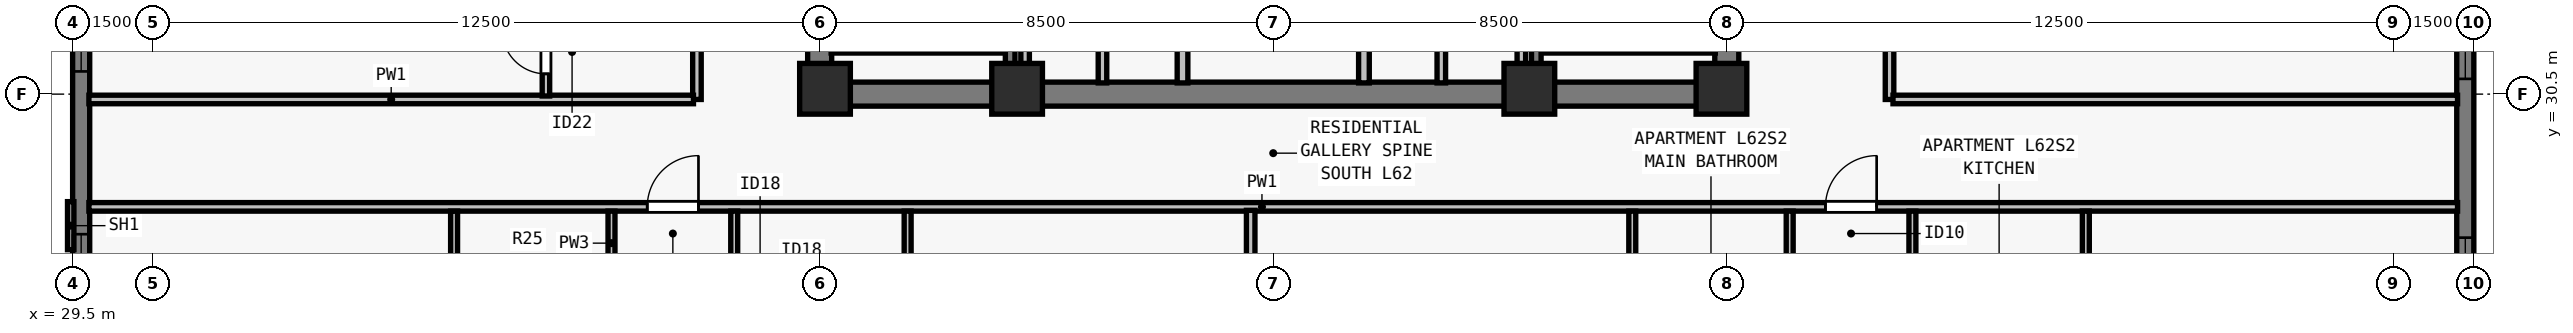
"""IFC4 building model, lengths in metres.
Left out: names, types, materials, properties, quantities, classifications, styles, units other than length and angle.
Written with IfcOpenShell. Run it as: python <this file> out.ifc"""

import sys

from ifc_helpers import new_model, si_unit, direction, frame, frame_2d, origin, origin_2d, place, context, subcontext, project, spatial, rectangle, extrude, element, fill, save


model = new_model("IFC4")
c1 = context("Model", 3, precision=1e-05, world=origin(), true_north=direction((0.0, 1.0)))
c2 = subcontext(c1, "Body", "Model", "MODEL_VIEW")
j1 = project(units=[si_unit("LENGTHUNIT", "METRE"), si_unit("PLANEANGLEUNIT", "RADIAN")], contexts=[c1])
p1 = place(None, origin())
s1 = spatial("IfcSite", under=j1, at=p1, CompositionType="ELEMENT")
p2 = place(p1, origin())
s2 = spatial("IfcBuilding", under=s1, at=p2, CompositionType="ELEMENT")
p3 = place(p2, frame((0.0, 0.0, 227.0)))
s3 = spatial("IfcBuildingStorey", under=s2, at=p3, CompositionType="ELEMENT", Elevation=227.0)
for number, where, z_axis, x_axis in (
    (1, (43.6, 30.6, 0.0), (0.0, 0.0, 1.0), (1.0, 0.0, 0.0)),
    (2, (47.2, 30.6, 0.0), (0.0, 0.0, 1.0), (1.0, 0.0, 0.0)),
    (3, (56.8, 30.6, 0.0), (0.0, 0.0, 1.0), (1.0, 0.0, 0.0)),
    (4, (60.4, 30.6, 0.0), (0.0, 0.0, 1.0), (1.0, 0.0, 0.0)),
):
    element("IfcColumn", number, at=place(p3, frame(where, z_axis=z_axis, x_axis=x_axis)), inside=s3, PredefinedType="COLUMN", context=c2, shape_type="SweptSolid", body=[
        extrude(rectangle(XDim=0.95, YDim=0.95, at=origin_2d()), origin(), (0.0, 0.0, 1.0), 3.5),
    ])
p4 = place(p3, frame((74.34, 56.5, 0.0), z_axis=(0.0, 0.0, 1.0), x_axis=(0.0, -1.0, 0.0)))
e5 = element("IfcWall", 5, at=p4, inside=s3, PredefinedType="SOLIDWALL", context=c2, shape_type="SweptSolid", body=[
    extrude(rectangle(XDim=34.702, YDim=0.32, at=frame_2d((17.351, 0.0))), origin(), (0.0, 0.0, 1.0), 3.29),
])
p5 = place(p4, frame((4.763, 0.0, 0.8)))
e6 = element("IfcOpeningElement", 6, at=p5, cuts=e5, PredefinedType="OPENING", context=c2, shape_type="SweptSolid", body=[
    extrude(rectangle(XDim=1.55, YDim=1.678, at=frame_2d((0.775, 0.839))), frame((0.0, 0.17, 0.0), z_axis=(0.0, -1.0, 0.0), x_axis=(1.0, 0.0, 0.0)), (0.0, 0.0, 1.0), 0.34),
])
p6 = place(p4, frame((9.238, 0.0, 0.8)))
e7 = element("IfcOpeningElement", 7, at=p6, cuts=e5, PredefinedType="OPENING", context=c2, shape_type="SweptSolid", body=[
    extrude(rectangle(XDim=1.85, YDim=1.678, at=frame_2d((0.925, 0.839))), frame((0.0, 0.17, 0.0), z_axis=(0.0, -1.0, 0.0), x_axis=(1.0, 0.0, 0.0)), (0.0, 0.0, 1.0), 0.34),
])
p7 = place(p4, frame((14.738, 0.0, 0.8)))
e8 = element("IfcOpeningElement", 8, at=p7, cuts=e5, PredefinedType="OPENING", context=c2, shape_type="SweptSolid", body=[
    extrude(rectangle(XDim=1.85, YDim=1.678, at=frame_2d((0.925, 0.839))), frame((0.0, 0.17, 0.0), z_axis=(0.0, -1.0, 0.0), x_axis=(1.0, 0.0, 0.0)), (0.0, 0.0, 1.0), 0.34),
])
p8 = place(p4, frame((18.264, 0.0, 0.8)))
e9 = element("IfcOpeningElement", 9, at=p8, cuts=e5, PredefinedType="OPENING", context=c2, shape_type="SweptSolid", body=[
    extrude(rectangle(XDim=1.55, YDim=1.678, at=frame_2d((0.775, 0.839))), frame((0.0, 0.17, 0.0), z_axis=(0.0, -1.0, 0.0), x_axis=(1.0, 0.0, 0.0)), (0.0, 0.0, 1.0), 0.34),
])
p9 = place(p4, frame((24.164, 0.0, 0.8)))
e10 = element("IfcOpeningElement", 10, at=p9, cuts=e5, PredefinedType="OPENING", context=c2, shape_type="SweptSolid", body=[
    extrude(rectangle(XDim=1.55, YDim=1.678, at=frame_2d((0.775, 0.839))), frame((0.0, 0.17, 0.0), z_axis=(0.0, -1.0, 0.0), x_axis=(1.0, 0.0, 0.0)), (0.0, 0.0, 1.0), 0.34),
])
p10 = place(p4, frame((28.689, 0.0, 0.8)))
e11 = element("IfcOpeningElement", 11, at=p10, cuts=e5, PredefinedType="OPENING", context=c2, shape_type="SweptSolid", body=[
    extrude(rectangle(XDim=1.85, YDim=1.678, at=frame_2d((0.925, 0.839))), frame((0.0, 0.17, 0.0), z_axis=(0.0, -1.0, 0.0), x_axis=(1.0, 0.0, 0.0)), (0.0, 0.0, 1.0), 0.34),
])
p11 = place(p4, frame((31.35, 0.0, 0.8)))
e12 = element("IfcOpeningElement", 12, at=p11, cuts=e5, PredefinedType="OPENING", context=c2, shape_type="SweptSolid", body=[
    extrude(rectangle(XDim=0.9, YDim=1.678, at=frame_2d((0.45, 0.839))), frame((0.0, 0.17, 0.0), z_axis=(0.0, -1.0, 0.0), x_axis=(1.0, 0.0, 0.0)), (0.0, 0.0, 1.0), 0.34),
])
p12 = place(p3, frame((29.66, 21.5, 0.0), z_axis=(0.0, 0.0, 1.0), x_axis=(0.0, 1.0, 0.0)))
e13 = element("IfcWall", 13, at=p12, inside=s3, PredefinedType="SOLIDWALL", context=c2, shape_type="SweptSolid", body=[
    extrude(rectangle(XDim=22.602, YDim=0.32, at=frame_2d((11.301, 0.0))), origin(), (0.0, 0.0, 1.0), 3.29),
])
p13 = place(p12, frame((4.825, 0.0, 0.8)))
e14 = element("IfcOpeningElement", 14, at=p13, cuts=e13, PredefinedType="OPENING", context=c2, shape_type="SweptSolid", body=[
    extrude(rectangle(XDim=1.55, YDim=1.678, at=frame_2d((0.775, 0.839))), frame((0.0, 0.17, 0.0), z_axis=(0.0, -1.0, 0.0), x_axis=(1.0, 0.0, 0.0)), (0.0, 0.0, 1.0), 0.34),
])
p14 = place(p12, frame((9.426, 0.0, 0.8)))
e15 = element("IfcOpeningElement", 15, at=p14, cuts=e13, PredefinedType="OPENING", context=c2, shape_type="SweptSolid", body=[
    extrude(rectangle(XDim=1.85, YDim=1.678, at=frame_2d((0.925, 0.839))), frame((0.0, 0.17, 0.0), z_axis=(0.0, -1.0, 0.0), x_axis=(1.0, 0.0, 0.0)), (0.0, 0.0, 1.0), 0.34),
])
p15 = place(p12, frame((15.177, 0.0, 0.8)))
e16 = element("IfcOpeningElement", 16, at=p15, cuts=e13, PredefinedType="OPENING", context=c2, shape_type="SweptSolid", body=[
    extrude(rectangle(XDim=1.85, YDim=1.678, at=frame_2d((0.925, 0.839))), frame((0.0, 0.17, 0.0), z_axis=(0.0, -1.0, 0.0), x_axis=(1.0, 0.0, 0.0)), (0.0, 0.0, 1.0), 0.34),
])
p16 = place(p12, frame((19.677, 0.0, 0.8)))
e17 = element("IfcOpeningElement", 17, at=p16, cuts=e13, PredefinedType="OPENING", context=c2, shape_type="SweptSolid", body=[
    extrude(rectangle(XDim=1.55, YDim=1.678, at=frame_2d((0.775, 0.839))), frame((0.0, 0.17, 0.0), z_axis=(0.0, -1.0, 0.0), x_axis=(1.0, 0.0, 0.0)), (0.0, 0.0, 1.0), 0.34),
])
p17 = place(p3, frame((43.275, 30.5, 0.0), z_axis=(0.0, 0.0, 1.0), x_axis=(1.0, 0.0, 0.0)))
e18 = element("IfcWall", 18, at=p17, inside=s3, PredefinedType="SHEAR", context=c2, shape_type="SweptSolid", body=[
    extrude(rectangle(XDim=17.45, YDim=0.45, at=frame_2d((8.725, 0.0))), origin(), (0.0, 0.0, 1.0), 3.29),
])
for number, where, z_axis, x_axis in (
    (19, (43.5, 30.715, 0.0), (0.0, 0.0, 1.0), (0.0, 1.0, 0.0)),
    (20, (60.5, 30.715, 0.0), (0.0, 0.0, 1.0), (0.0, 1.0, 0.0)),
):
    element("IfcWall", number, at=place(p3, frame(where, z_axis=z_axis, x_axis=x_axis)), inside=s3, PredefinedType="SHEAR", context=c2, shape_type="SweptSolid", body=[
        extrude(rectangle(XDim=8.035, YDim=0.45, at=frame_2d((4.018, 0.0))), origin(), (0.0, 0.0, 1.0), 3.29),
    ])
p18 = place(p3, frame((50.3, 30.71, 0.0), z_axis=(0.0, 0.0, 1.0), x_axis=(0.0, 1.0, 0.0)))
e21 = element("IfcWall", 21, at=p18, inside=s3, PredefinedType="SOLIDWALL", context=c2, shape_type="SweptSolid", body=[
    extrude(rectangle(XDim=7.905, YDim=0.2, at=frame_2d((3.953, 0.0))), origin(), (0.0, 0.0, 1.0), 3.29),
])
p19 = place(p18, frame((2.14, 0.0, 0.0)))
e22 = element("IfcOpeningElement", 22, at=p19, cuts=e21, PredefinedType="OPENING", context=c2, shape_type="SweptSolid", body=[
    extrude(rectangle(XDim=0.95, YDim=2.12, at=frame_2d((0.475, 1.06))), frame((0.0, 0.11, 0.0), z_axis=(0.0, -1.0, 0.0), x_axis=(1.0, 0.0, 0.0)), (0.0, 0.0, 1.0), 0.22),
])
p20 = place(p3, frame((53.7, 30.71, 0.0), z_axis=(0.0, 0.0, 1.0), x_axis=(0.0, 1.0, 0.0)))
e23 = element("IfcWall", 23, at=p20, inside=s3, PredefinedType="SOLIDWALL", context=c2, shape_type="SweptSolid", body=[
    extrude(rectangle(XDim=7.905, YDim=0.2, at=frame_2d((3.953, 0.0))), origin(), (0.0, 0.0, 1.0), 3.29),
])
p21 = place(p20, frame((2.14, 0.0, 0.0)))
e24 = element("IfcOpeningElement", 24, at=p21, cuts=e23, PredefinedType="OPENING", context=c2, shape_type="SweptSolid", body=[
    extrude(rectangle(XDim=0.95, YDim=2.12, at=frame_2d((0.475, 1.06))), frame((0.0, 0.11, 0.0), z_axis=(0.0, -1.0, 0.0), x_axis=(1.0, 0.0, 0.0)), (0.0, 0.0, 1.0), 0.22),
])
p22 = place(p3, frame((47.35, 30.71, 0.0), z_axis=(0.0, 0.0, 1.0), x_axis=(0.0, 1.0, 0.0)))
e25 = element("IfcWall", 25, at=p22, inside=s3, PredefinedType="PARTITIONING", context=c2, shape_type="SweptSolid", body=[
    extrude(rectangle(XDim=7.905, YDim=0.16, at=frame_2d((3.953, 0.0))), origin(), (0.0, 0.0, 1.0), 3.29),
])
p23 = place(p3, frame((48.8, 30.71, 0.0), z_axis=(0.0, 0.0, 1.0), x_axis=(0.0, 1.0, 0.0)))
e26 = element("IfcWall", 26, at=p23, inside=s3, PredefinedType="PARTITIONING", context=c2, shape_type="SweptSolid", body=[
    extrude(rectangle(XDim=7.905, YDim=0.16, at=frame_2d((3.953, 0.0))), origin(), (0.0, 0.0, 1.0), 3.29),
])
p24 = place(p23, frame((3.54, 0.0, 0.0)))
e27 = element("IfcOpeningElement", 27, at=p24, cuts=e26, PredefinedType="OPENING", context=c2, shape_type="SweptSolid", body=[
    extrude(rectangle(XDim=0.85, YDim=2.12, at=frame_2d((0.425, 1.06))), frame((0.0, 0.09, 0.0), z_axis=(0.0, -1.0, 0.0), x_axis=(1.0, 0.0, 0.0)), (0.0, 0.0, 1.0), 0.18),
])
p25 = place(p3, frame((56.65, 30.71, 0.0), z_axis=(0.0, 0.0, 1.0), x_axis=(0.0, 1.0, 0.0)))
e28 = element("IfcWall", 28, at=p25, inside=s3, PredefinedType="PARTITIONING", context=c2, shape_type="SweptSolid", body=[
    extrude(rectangle(XDim=7.905, YDim=0.16, at=frame_2d((3.953, 0.0))), origin(), (0.0, 0.0, 1.0), 3.29),
])
p26 = place(p3, frame((55.15, 30.71, 0.0), z_axis=(0.0, 0.0, 1.0), x_axis=(0.0, 1.0, 0.0)))
e29 = element("IfcWall", 29, at=p26, inside=s3, PredefinedType="PARTITIONING", context=c2, shape_type="SweptSolid", body=[
    extrude(rectangle(XDim=7.905, YDim=0.16, at=frame_2d((3.953, 0.0))), origin(), (0.0, 0.0, 1.0), 3.29),
])
p27 = place(p26, frame((3.54, 0.0, 0.0)))
e30 = element("IfcOpeningElement", 30, at=p27, cuts=e29, PredefinedType="OPENING", context=c2, shape_type="SweptSolid", body=[
    extrude(rectangle(XDim=0.85, YDim=2.12, at=frame_2d((0.425, 1.06))), frame((0.0, 0.09, 0.0), z_axis=(0.0, -1.0, 0.0), x_axis=(1.0, 0.0, 0.0)), (0.0, 0.0, 1.0), 0.18),
])
p28 = place(p3, frame((29.805, 28.387, 0.0), z_axis=(0.0, 0.0, 1.0), x_axis=(1.0, 0.0, 0.0)))
e31 = element("IfcWall", 31, at=p28, inside=s3, PredefinedType="PARTITIONING", context=c2, shape_type="SweptSolid", body=[
    extrude(rectangle(XDim=44.39, YDim=0.16, at=frame_2d((22.195, 0.0))), origin(), (0.0, 0.0, 1.0), 2.958),
])
p29 = place(p28, frame((10.464, 0.0, 0.0)))
e32 = element("IfcOpeningElement", 32, at=p29, cuts=e31, PredefinedType="OPENING", context=c2, shape_type="SweptSolid", body=[
    extrude(rectangle(XDim=0.96, YDim=2.18, at=frame_2d((0.48, 1.09))), frame((0.0, 0.09, 0.0), z_axis=(0.0, -1.0, 0.0), x_axis=(1.0, 0.0, 0.0)), (0.0, 0.0, 1.0), 0.18),
])
p30 = place(p28, frame((32.544, 0.0, 0.0)))
e33 = element("IfcOpeningElement", 33, at=p30, cuts=e31, PredefinedType="OPENING", context=c2, shape_type="SweptSolid", body=[
    extrude(rectangle(XDim=0.96, YDim=2.18, at=frame_2d((0.48, 1.09))), frame((0.0, 0.09, 0.0), z_axis=(0.0, -1.0, 0.0), x_axis=(1.0, 0.0, 0.0)), (0.0, 0.0, 1.0), 0.18),
])
p31 = place(p3, frame((41.2, 30.4, 0.0), z_axis=(0.0, 0.0, 1.0), x_axis=(0.0, 1.0, 0.0)))
e34 = element("IfcWall", 34, at=p31, inside=s3, PredefinedType="PARTITIONING", context=c2, shape_type="SweptSolid", body=[
    extrude(rectangle(XDim=17.2, YDim=0.16, at=frame_2d((8.6, 0.0))), origin(), (0.0, 0.0, 1.0), 3.29),
])
p32 = place(p31, frame((8.12, 0.0, 0.0)))
e35 = element("IfcOpeningElement", 35, at=p32, cuts=e34, PredefinedType="OPENING", context=c2, shape_type="SweptSolid", body=[
    extrude(rectangle(XDim=0.96, YDim=2.18, at=frame_2d((0.48, 1.09))), frame((0.0, 0.09, 0.0), z_axis=(0.0, -1.0, 0.0), x_axis=(1.0, 0.0, 0.0)), (0.0, 0.0, 1.0), 0.18),
])
p33 = place(p3, frame((63.55, 30.4, 0.0), z_axis=(0.0, 0.0, 1.0), x_axis=(0.0, 1.0, 0.0)))
e36 = element("IfcWall", 36, at=p33, inside=s3, PredefinedType="PARTITIONING", context=c2, shape_type="SweptSolid", body=[
    extrude(rectangle(XDim=17.2, YDim=0.16, at=frame_2d((8.6, 0.0))), origin(), (0.0, 0.0, 1.0), 3.29),
])
p34 = place(p33, frame((3.6, 0.0, 0.0)))
e37 = element("IfcOpeningElement", 37, at=p34, cuts=e36, PredefinedType="OPENING", context=c2, shape_type="SweptSolid", body=[
    extrude(rectangle(XDim=0.96, YDim=2.12, at=frame_2d((0.48, 1.06))), frame((0.0, 0.09, 0.0), z_axis=(0.0, -1.0, 0.0), x_axis=(1.0, 0.0, 0.0)), (0.0, 0.0, 1.0), 0.18),
])
p35 = place(p33, frame((12.44, 0.0, 0.0)))
e38 = element("IfcOpeningElement", 38, at=p35, cuts=e36, PredefinedType="OPENING", context=c2, shape_type="SweptSolid", body=[
    extrude(rectangle(XDim=0.96, YDim=2.18, at=frame_2d((0.48, 1.09))), frame((0.0, 0.09, 0.0), z_axis=(0.0, -1.0, 0.0), x_axis=(1.0, 0.0, 0.0)), (0.0, 0.0, 1.0), 0.18),
])
p36 = place(p3, frame((29.805, 30.4, 0.0), z_axis=(0.0, 0.0, 1.0), x_axis=(1.0, 0.0, 0.0)))
e39 = element("IfcWall", 39, at=p36, inside=s3, PredefinedType="PARTITIONING", context=c2, shape_type="SweptSolid", body=[
    extrude(rectangle(XDim=11.33, YDim=0.16, at=frame_2d((5.665, 0.0))), origin(), (0.0, 0.0, 1.0), 3.29),
])
p37 = place(p3, frame((63.615, 30.4, 0.0), z_axis=(0.0, 0.0, 1.0), x_axis=(1.0, 0.0, 0.0)))
e40 = element("IfcWall", 40, at=p37, inside=s3, PredefinedType="PARTITIONING", context=c2, shape_type="SweptSolid", body=[
    extrude(rectangle(XDim=10.58, YDim=0.16, at=frame_2d((5.29, 0.0))), origin(), (0.0, 0.0, 1.0), 3.29),
])
p38 = place(p3, frame((36.649, 25.558, 0.0), z_axis=(0.0, 0.0, 1.0), x_axis=(0.0, 1.0, 0.0)))
e41 = element("IfcWall", 41, at=p38, inside=s3, PredefinedType="PLUMBINGWALL", context=c2, shape_type="SweptSolid", body=[
    extrude(rectangle(XDim=2.75, YDim=0.13, at=frame_2d((1.375, 0.0))), origin(), (0.0, 0.0, 1.0), 3.29),
])
p39 = place(p3, frame((39.599, 25.558, 0.0), z_axis=(0.0, 0.0, 1.0), x_axis=(0.0, 1.0, 0.0)))
e42 = element("IfcWall", 42, at=p39, inside=s3, PredefinedType="PLUMBINGWALL", context=c2, shape_type="SweptSolid", body=[
    extrude(rectangle(XDim=2.75, YDim=0.13, at=frame_2d((1.375, 0.0))), origin(), (0.0, 0.0, 1.0), 3.29),
])
p40 = place(p39, frame((0.55, 0.0, 0.0)))
e43 = element("IfcOpeningElement", 43, at=p40, cuts=e42, PredefinedType="OPENING", context=c2, shape_type="SweptSolid", body=[
    extrude(rectangle(XDim=0.85, YDim=2.08, at=frame_2d((0.425, 1.04))), frame((0.0, 0.075, 0.0), z_axis=(0.0, -1.0, 0.0), x_axis=(1.0, 0.0, 0.0)), (0.0, 0.0, 1.0), 0.15),
])
p41 = place(p3, frame((45.149, 25.558, 0.0), z_axis=(0.0, 0.0, 1.0), x_axis=(0.0, 1.0, 0.0)))
e44 = element("IfcWall", 44, at=p41, inside=s3, PredefinedType="PLUMBINGWALL", context=c2, shape_type="SweptSolid", body=[
    extrude(rectangle(XDim=2.75, YDim=0.13, at=frame_2d((1.375, 0.0))), origin(), (0.0, 0.0, 1.0), 3.29),
])
p42 = place(p3, frame((41.899, 25.558, 0.0), z_axis=(0.0, 0.0, 1.0), x_axis=(0.0, 1.0, 0.0)))
e45 = element("IfcWall", 45, at=p42, inside=s3, PredefinedType="PLUMBINGWALL", context=c2, shape_type="SweptSolid", body=[
    extrude(rectangle(XDim=2.75, YDim=0.13, at=frame_2d((1.375, 0.0))), origin(), (0.0, 0.0, 1.0), 2.573),
])
p43 = place(p42, frame((0.55, 0.0, 0.0)))
e46 = element("IfcOpeningElement", 46, at=p43, cuts=e45, PredefinedType="OPENING", context=c2, shape_type="SweptSolid", body=[
    extrude(rectangle(XDim=0.88, YDim=2.1, at=frame_2d((0.44, 1.05))), frame((0.0, 0.075, 0.0), z_axis=(0.0, -1.0, 0.0), x_axis=(1.0, 0.0, 0.0)), (0.0, 0.0, 1.0), 0.15),
])
p44 = place(p3, frame((51.577, 16.805, 0.0), z_axis=(0.0, 0.0, 1.0), x_axis=(0.0, 1.0, 0.0)))
e47 = element("IfcWall", 47, at=p44, inside=s3, PredefinedType="PARTITIONING", context=c2, shape_type="SweptSolid", body=[
    extrude(rectangle(XDim=11.518, YDim=0.16, at=frame_2d((5.759, 0.0))), origin(), (0.0, 0.0, 1.0), 2.958),
])
p45 = place(p3, frame((58.729, 25.558, 0.0), z_axis=(0.0, 0.0, 1.0), x_axis=(0.0, 1.0, 0.0)))
e48 = element("IfcWall", 48, at=p45, inside=s3, PredefinedType="PLUMBINGWALL", context=c2, shape_type="SweptSolid", body=[
    extrude(rectangle(XDim=2.75, YDim=0.13, at=frame_2d((1.375, 0.0))), origin(), (0.0, 0.0, 1.0), 3.29),
])
p46 = place(p3, frame((61.679, 25.558, 0.0), z_axis=(0.0, 0.0, 1.0), x_axis=(0.0, 1.0, 0.0)))
e49 = element("IfcWall", 49, at=p46, inside=s3, PredefinedType="PLUMBINGWALL", context=c2, shape_type="SweptSolid", body=[
    extrude(rectangle(XDim=2.75, YDim=0.13, at=frame_2d((1.375, 0.0))), origin(), (0.0, 0.0, 1.0), 3.29),
])
p47 = place(p46, frame((0.55, 0.0, 0.0)))
e50 = element("IfcOpeningElement", 50, at=p47, cuts=e49, PredefinedType="OPENING", context=c2, shape_type="SweptSolid", body=[
    extrude(rectangle(XDim=0.85, YDim=2.08, at=frame_2d((0.425, 1.04))), frame((0.0, 0.075, 0.0), z_axis=(0.0, -1.0, 0.0), x_axis=(1.0, 0.0, 0.0)), (0.0, 0.0, 1.0), 0.15),
])
p48 = place(p3, frame((67.229, 25.558, 0.0), z_axis=(0.0, 0.0, 1.0), x_axis=(0.0, 1.0, 0.0)))
e51 = element("IfcWall", 51, at=p48, inside=s3, PredefinedType="PLUMBINGWALL", context=c2, shape_type="SweptSolid", body=[
    extrude(rectangle(XDim=2.75, YDim=0.13, at=frame_2d((1.375, 0.0))), origin(), (0.0, 0.0, 1.0), 3.29),
])
p49 = place(p3, frame((63.979, 25.558, 0.0), z_axis=(0.0, 0.0, 1.0), x_axis=(0.0, 1.0, 0.0)))
e52 = element("IfcWall", 52, at=p49, inside=s3, PredefinedType="PLUMBINGWALL", context=c2, shape_type="SweptSolid", body=[
    extrude(rectangle(XDim=2.75, YDim=0.13, at=frame_2d((1.375, 0.0))), origin(), (0.0, 0.0, 1.0), 3.29),
])
p50 = place(p49, frame((0.55, 0.0, 0.0)))
e53 = element("IfcOpeningElement", 53, at=p50, cuts=e52, PredefinedType="OPENING", context=c2, shape_type="SweptSolid", body=[
    extrude(rectangle(XDim=0.88, YDim=2.1, at=frame_2d((0.44, 1.05))), frame((0.0, 0.075, 0.0), z_axis=(0.0, -1.0, 0.0), x_axis=(1.0, 0.0, 0.0)), (0.0, 0.0, 1.0), 0.15),
])
p51 = place(p3, frame((38.37, 30.465, 0.0), z_axis=(0.0, 0.0, 1.0), x_axis=(0.0, 1.0, 0.0)))
e54 = element("IfcWall", 54, at=p51, inside=s3, PredefinedType="PARTITIONING", context=c2, shape_type="SweptSolid", body=[
    extrude(rectangle(XDim=4.16, YDim=0.14, at=frame_2d((2.08, 0.0))), origin(), (0.0, 0.0, 1.0), 3.29),
])
p52 = place(p51, frame((0.415, 0.0, 0.0)))
e55 = element("IfcOpeningElement", 55, at=p52, cuts=e54, PredefinedType="OPENING", context=c2, shape_type="SweptSolid", body=[
    extrude(rectangle(XDim=0.82, YDim=2.1, at=frame_2d((0.41, 1.05))), frame((0.0, 0.08, 0.0), z_axis=(0.0, -1.0, 0.0), x_axis=(1.0, 0.0, 0.0)), (0.0, 0.0, 1.0), 0.16),
])
p53 = place(p3, frame((43.715, 31.36, 0.0), z_axis=(0.0, 0.0, 1.0), x_axis=(1.0, 0.0, 0.0)))
e56 = element("IfcWall", 56, at=p53, inside=s3, PredefinedType="SOLIDWALL", context=c2, shape_type="SweptSolid", body=[
    extrude(rectangle(XDim=3.28, YDim=0.18, at=frame_2d((1.64, 0.0))), origin(), (0.0, 0.0, 1.0), 3.29),
])
p54 = place(p3, frame((47.07, 38.78, 0.0), z_axis=(0.0, 0.0, 1.0), x_axis=(0.0, -1.0, 0.0)))
e57 = element("IfcWall", 57, at=p54, inside=s3, PredefinedType="SOLIDWALL", context=c2, shape_type="SweptSolid", body=[
    extrude(rectangle(XDim=8.067, YDim=0.18, at=frame_2d((4.034, 0.0))), origin(), (0.0, 0.0, 1.0), 3.29),
])
p55 = place(p3, frame((57.005, 31.36, 0.0), z_axis=(0.0, 0.0, 1.0), x_axis=(1.0, 0.0, 0.0)))
e58 = element("IfcWall", 58, at=p55, inside=s3, PredefinedType="SOLIDWALL", context=c2, shape_type="SweptSolid", body=[
    extrude(rectangle(XDim=3.28, YDim=0.18, at=frame_2d((1.64, 0.0))), origin(), (0.0, 0.0, 1.0), 3.29),
])
p56 = place(p3, frame((56.93, 38.78, 0.0), z_axis=(0.0, 0.0, 1.0), x_axis=(0.0, -1.0, 0.0)))
e59 = element("IfcWall", 59, at=p56, inside=s3, PredefinedType="SOLIDWALL", context=c2, shape_type="SweptSolid", body=[
    extrude(rectangle(XDim=8.067, YDim=0.18, at=frame_2d((4.034, 0.0))), origin(), (0.0, 0.0, 1.0), 3.29),
])
p57 = place(p9, origin())
e60 = element("IfcWindow", 60, at=p57, inside=s3, PartitioningType="SINGLE_PANEL", PredefinedType="WINDOW", context=c2, shape_type="SweptSolid", body=[
    extrude(rectangle(XDim=1.55, YDim=1.678, at=frame_2d((0.775, 0.839))), frame((0.0, -0.05, 0.0), z_axis=(0.0, -1.0, 0.0), x_axis=(1.0, 0.0, 0.0)), (0.0, 0.0, 1.0), 0.06),
])
fill(e10, e60)
p58 = place(p10, origin())
e61 = element("IfcWindow", 61, at=p58, inside=s3, PartitioningType="SINGLE_PANEL", PredefinedType="WINDOW", context=c2, shape_type="SweptSolid", body=[
    extrude(rectangle(XDim=1.85, YDim=1.678, at=frame_2d((0.925, 0.839))), frame((0.0, -0.05, 0.0), z_axis=(0.0, -1.0, 0.0), x_axis=(1.0, 0.0, 0.0)), (0.0, 0.0, 1.0), 0.06),
])
fill(e11, e61)
p59 = place(p13, origin())
e62 = element("IfcWindow", 62, at=p59, inside=s3, PartitioningType="SINGLE_PANEL", PredefinedType="WINDOW", context=c2, shape_type="SweptSolid", body=[
    extrude(rectangle(XDim=1.55, YDim=1.678, at=frame_2d((0.775, 0.839))), frame((0.0, -0.05, 0.0), z_axis=(0.0, -1.0, 0.0), x_axis=(1.0, 0.0, 0.0)), (0.0, 0.0, 1.0), 0.06),
])
fill(e14, e62)
p60 = place(p14, origin())
e63 = element("IfcWindow", 63, at=p60, inside=s3, PartitioningType="SINGLE_PANEL", PredefinedType="WINDOW", context=c2, shape_type="SweptSolid", body=[
    extrude(rectangle(XDim=1.85, YDim=1.678, at=frame_2d((0.925, 0.839))), frame((0.0, -0.05, 0.0), z_axis=(0.0, -1.0, 0.0), x_axis=(1.0, 0.0, 0.0)), (0.0, 0.0, 1.0), 0.06),
])
fill(e15, e63)
p61 = place(p29, origin())
e64 = element("IfcDoor", 64, at=p61, inside=s3, OperationType="SINGLE_SWING_RIGHT", PredefinedType="DOOR", context=c2, shape_type="SweptSolid", body=[
    extrude(rectangle(XDim=0.96, YDim=2.18, at=frame_2d((0.48, 1.09))), frame((0.0, 0.025, 0.0), z_axis=(0.0, -1.0, 0.0), x_axis=(1.0, 0.0, 0.0)), (0.0, 0.0, 1.0), 0.05),
])
fill(e32, e64)
p62 = place(p30, origin())
e65 = element("IfcDoor", 65, at=p62, inside=s3, OperationType="SINGLE_SWING_RIGHT", PredefinedType="DOOR", context=c2, shape_type="SweptSolid", body=[
    extrude(rectangle(XDim=0.96, YDim=2.18, at=frame_2d((0.48, 1.09))), frame((0.0, 0.025, 0.0), z_axis=(0.0, -1.0, 0.0), x_axis=(1.0, 0.0, 0.0)), (0.0, 0.0, 1.0), 0.05),
])
fill(e33, e65)
p63 = place(p52, origin())
e66 = element("IfcDoor", 66, at=p63, inside=s3, OperationType="SINGLE_SWING_RIGHT", PredefinedType="DOOR", context=c2, shape_type="SweptSolid", body=[
    extrude(rectangle(XDim=0.82, YDim=2.1, at=frame_2d((0.41, 1.05))), frame((0.0, 0.025, 0.0), z_axis=(0.0, -1.0, 0.0), x_axis=(1.0, 0.0, 0.0)), (0.0, 0.0, 1.0), 0.05),
])
fill(e55, e66)
save(model, sys.argv[1])
